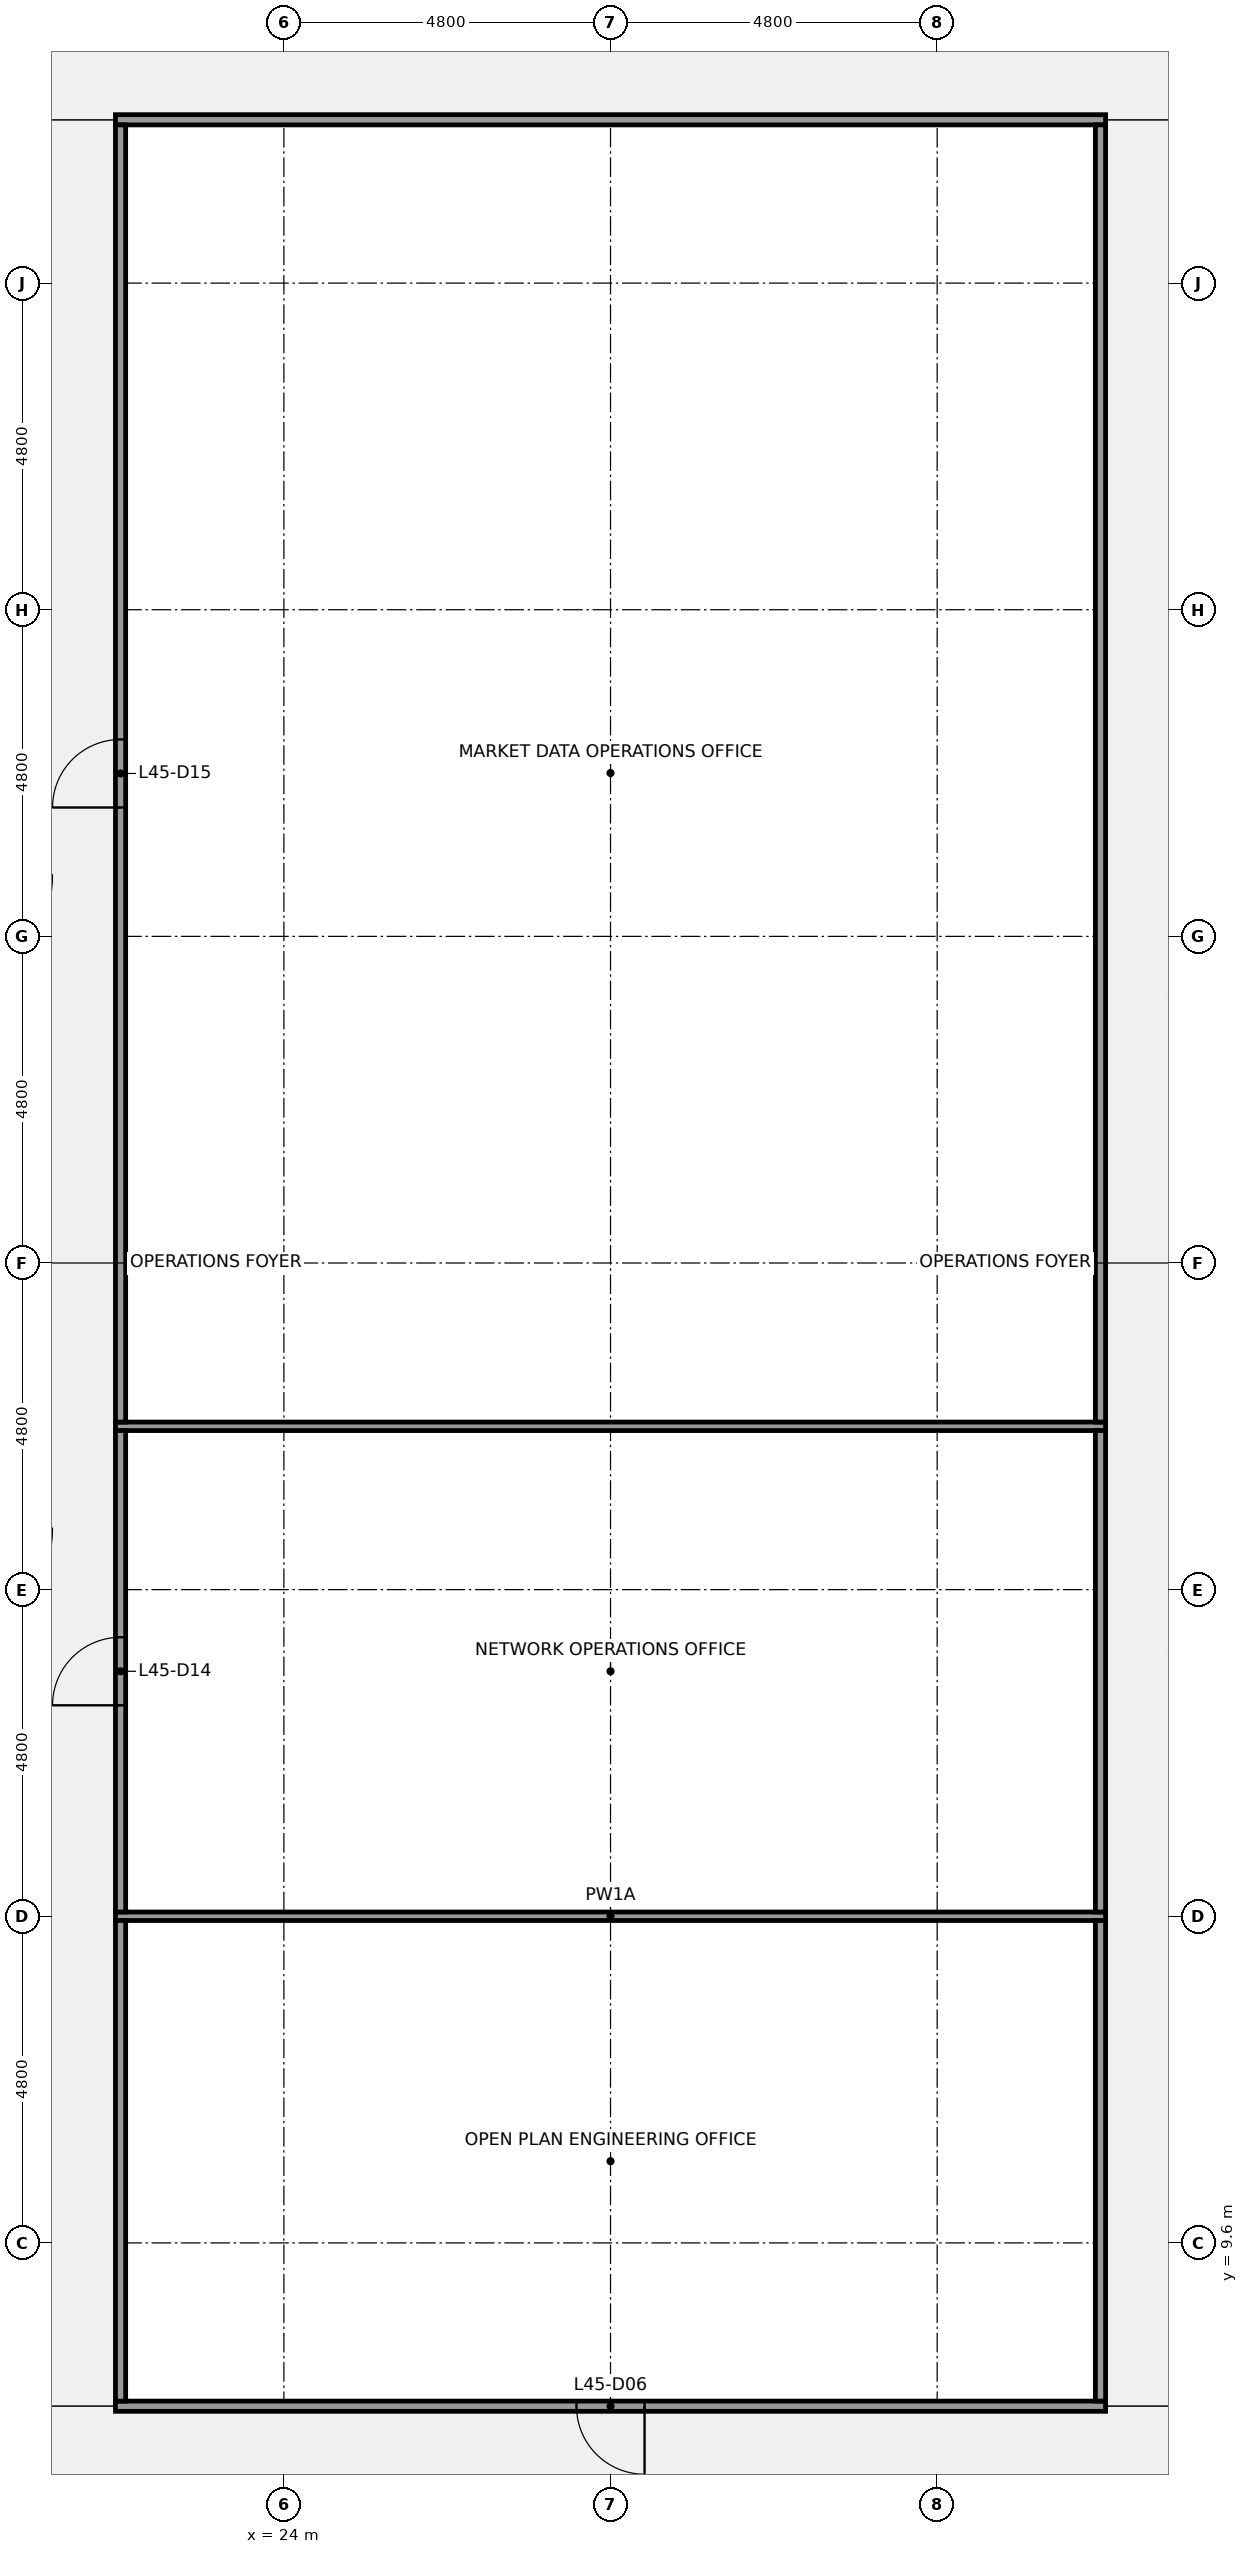
"""IFC4 building model, lengths in metres.
Left out: names, types, materials, properties, quantities, classifications, styles, units other than length and angle.
Written with IfcOpenShell. Run it as: python <this file> out.ifc"""

import sys

from ifc_helpers import new_model, si_unit, direction, frame, frame_2d, origin, place, context, subcontext, project, spatial, rectangle, extrude, element, fill, save


model = new_model("IFC4")
c1 = context("Model", 3, precision=1e-05, world=origin(), true_north=direction((0.0, 1.0)))
c2 = subcontext(c1, "Body", "Model", "MODEL_VIEW")
j1 = project(units=[si_unit("LENGTHUNIT", "METRE"), si_unit("PLANEANGLEUNIT", "RADIAN")], contexts=[c1])
p1 = place(None, origin())
s1 = spatial("IfcSite", under=j1, at=p1, CompositionType="ELEMENT")
p2 = place(p1, origin())
s2 = spatial("IfcBuilding", under=s1, at=p2, CompositionType="ELEMENT")
p3 = place(p2, frame((0.0, 0.0, 209.2)))
s3 = spatial("IfcBuildingStorey", under=s2, at=p3, CompositionType="ELEMENT", Elevation=209.2)
p4 = place(p3, frame((21.525, 7.2, 0.0), z_axis=(0.0, 0.0, 1.0), x_axis=(1.0, 0.0, 0.0)))
e1 = element("IfcWall", 1, at=p4, inside=s3, PredefinedType="PARTITIONING", context=c2, shape_type="SweptSolid", body=[
    extrude(rectangle(XDim=14.55, YDim=0.15, at=frame_2d((7.275, 0.0))), origin(), (0.0, 0.0, 1.0), 2.87),
])
p5 = place(p4, frame((6.775, 0.0, 0.0)))
e2 = element("IfcOpeningElement", 2, at=p5, cuts=e1, PredefinedType="OPENING", context=c2, shape_type="SweptSolid", body=[
    extrude(rectangle(XDim=1.0, YDim=2.1, at=frame_2d((0.5, 1.05))), frame((0.0, 0.085, 0.0), z_axis=(0.0, -1.0, 0.0), x_axis=(1.0, 0.0, 0.0)), (0.0, 0.0, 1.0), 0.17),
])
for number, where, z_axis, x_axis in (
    (3, (21.525, 14.4, 0.0), (0.0, 0.0, 1.0), (1.0, 0.0, 0.0)),
    (4, (21.525, 21.6, 0.0), (0.0, 0.0, 1.0), (1.0, 0.0, 0.0)),
):
    element("IfcWall", number, at=place(p3, frame(where, z_axis=z_axis, x_axis=x_axis)), inside=s3, PredefinedType="PARTITIONING", context=c2, shape_type="SweptSolid", body=[
        extrude(rectangle(XDim=14.55, YDim=0.125, at=frame_2d((7.275, 0.0))), origin(), (0.0, 0.0, 1.0), 2.87),
    ])
p6 = place(p3, frame((21.525, 40.8, 0.0), z_axis=(0.0, 0.0, 1.0), x_axis=(1.0, 0.0, 0.0)))
e5 = element("IfcWall", 5, at=p6, inside=s3, PredefinedType="PARTITIONING", context=c2, shape_type="SweptSolid", body=[
    extrude(rectangle(XDim=14.55, YDim=0.15, at=frame_2d((7.275, 0.0))), origin(), (0.0, 0.0, 1.0), 2.87),
])
p7 = place(p3, frame((21.6, 7.275, 0.0), z_axis=(0.0, 0.0, 1.0), x_axis=(0.0, 1.0, 0.0)))
e6 = element("IfcWall", 6, at=p7, inside=s3, PredefinedType="PARTITIONING", context=c2, shape_type="SweptSolid", body=[
    extrude(rectangle(XDim=7.062, YDim=0.15, at=frame_2d((3.531, 0.0))), origin(), (0.0, 0.0, 1.0), 2.87),
])
p8 = place(p3, frame((21.6, 14.462, 0.0), z_axis=(0.0, 0.0, 1.0), x_axis=(0.0, 1.0, 0.0)))
e7 = element("IfcWall", 7, at=p8, inside=s3, PredefinedType="PARTITIONING", context=c2, shape_type="SweptSolid", body=[
    extrude(rectangle(XDim=7.075, YDim=0.15, at=frame_2d((3.538, 0.0))), origin(), (0.0, 0.0, 1.0), 2.87),
])
p9 = place(p8, frame((3.038, 0.0, 0.0)))
e8 = element("IfcOpeningElement", 8, at=p9, cuts=e7, PredefinedType="OPENING", context=c2, shape_type="SweptSolid", body=[
    extrude(rectangle(XDim=1.0, YDim=2.1, at=frame_2d((0.5, 1.05))), frame((0.0, 0.085, 0.0), z_axis=(0.0, -1.0, 0.0), x_axis=(1.0, 0.0, 0.0)), (0.0, 0.0, 1.0), 0.17),
])
p10 = place(p3, frame((21.6, 21.663, 0.0), z_axis=(0.0, 0.0, 1.0), x_axis=(0.0, 1.0, 0.0)))
e9 = element("IfcWall", 9, at=p10, inside=s3, PredefinedType="PARTITIONING", context=c2, shape_type="SweptSolid", body=[
    extrude(rectangle(XDim=19.062, YDim=0.15, at=frame_2d((9.531, 0.0))), origin(), (0.0, 0.0, 1.0), 2.87),
])
p11 = place(p10, frame((9.031, 0.0, 0.0)))
e10 = element("IfcOpeningElement", 10, at=p11, cuts=e9, PredefinedType="OPENING", context=c2, shape_type="SweptSolid", body=[
    extrude(rectangle(XDim=1.0, YDim=2.1, at=frame_2d((0.5, 1.05))), frame((0.0, 0.085, 0.0), z_axis=(0.0, -1.0, 0.0), x_axis=(1.0, 0.0, 0.0)), (0.0, 0.0, 1.0), 0.17),
])
p12 = place(p3, frame((36.0, 7.275, 0.0), z_axis=(0.0, 0.0, 1.0), x_axis=(0.0, 1.0, 0.0)))
e11 = element("IfcWall", 11, at=p12, inside=s3, PredefinedType="PARTITIONING", context=c2, shape_type="SweptSolid", body=[
    extrude(rectangle(XDim=7.062, YDim=0.15, at=frame_2d((3.531, 0.0))), origin(), (0.0, 0.0, 1.0), 2.87),
])
p13 = place(p3, frame((36.0, 14.462, 0.0), z_axis=(0.0, 0.0, 1.0), x_axis=(0.0, 1.0, 0.0)))
e12 = element("IfcWall", 12, at=p13, inside=s3, PredefinedType="PARTITIONING", context=c2, shape_type="SweptSolid", body=[
    extrude(rectangle(XDim=7.075, YDim=0.15, at=frame_2d((3.538, 0.0))), origin(), (0.0, 0.0, 1.0), 2.87),
])
p14 = place(p3, frame((36.0, 21.663, 0.0), z_axis=(0.0, 0.0, 1.0), x_axis=(0.0, 1.0, 0.0)))
e13 = element("IfcWall", 13, at=p14, inside=s3, PredefinedType="PARTITIONING", context=c2, shape_type="SweptSolid", body=[
    extrude(rectangle(XDim=19.062, YDim=0.15, at=frame_2d((9.531, 0.0))), origin(), (0.0, 0.0, 1.0), 2.87),
])
p15 = place(p5, origin())
e14 = element("IfcDoor", 14, at=p15, inside=s3, OperationType="SINGLE_SWING_RIGHT", PredefinedType="DOOR", context=c2, shape_type="SweptSolid", body=[
    extrude(rectangle(XDim=1.0, YDim=2.1, at=frame_2d((0.5, 1.05))), frame((0.0, 0.025, 0.0), z_axis=(0.0, -1.0, 0.0), x_axis=(1.0, 0.0, 0.0)), (0.0, 0.0, 1.0), 0.05),
])
fill(e2, e14)
p16 = place(p9, origin())
e15 = element("IfcDoor", 15, at=p16, inside=s3, OperationType="SINGLE_SWING_LEFT", PredefinedType="DOOR", context=c2, shape_type="SweptSolid", body=[
    extrude(rectangle(XDim=1.0, YDim=2.1, at=frame_2d((0.5, 1.05))), frame((0.0, 0.025, 0.0), z_axis=(0.0, -1.0, 0.0), x_axis=(1.0, 0.0, 0.0)), (0.0, 0.0, 1.0), 0.05),
])
fill(e8, e15)
p17 = place(p11, origin())
e16 = element("IfcDoor", 16, at=p17, inside=s3, OperationType="SINGLE_SWING_LEFT", PredefinedType="DOOR", context=c2, shape_type="SweptSolid", body=[
    extrude(rectangle(XDim=1.0, YDim=2.1, at=frame_2d((0.5, 1.05))), frame((0.0, 0.025, 0.0), z_axis=(0.0, -1.0, 0.0), x_axis=(1.0, 0.0, 0.0)), (0.0, 0.0, 1.0), 0.05),
])
fill(e10, e16)
save(model, sys.argv[1])
